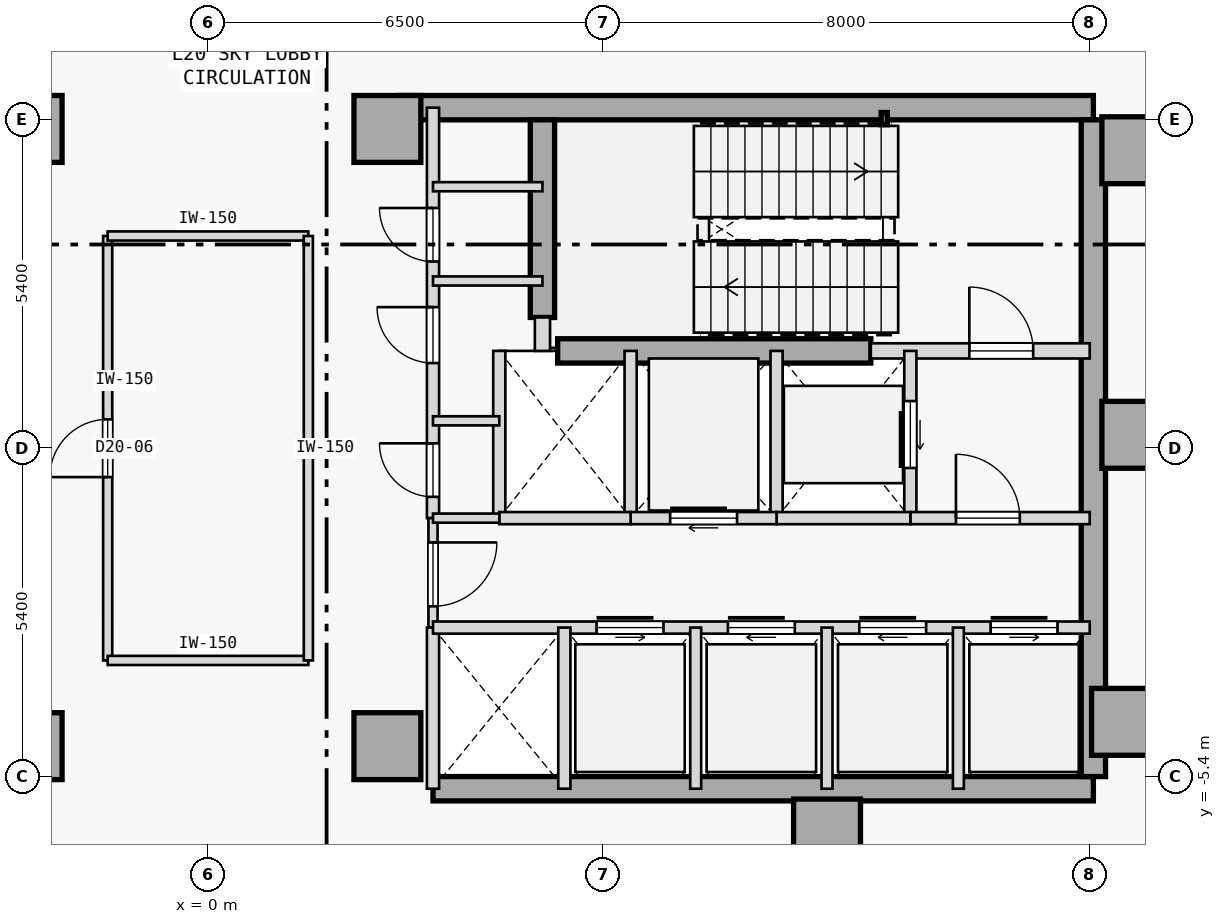
"""IFC4 building model, lengths in metres.
Left out: names, types, materials, properties, quantities, classifications, styles, units other than length and angle.
Written with IfcOpenShell. Run it as: python <this file> out.ifc"""

import sys

from ifc_helpers import new_model, si_unit, direction, frame, frame_2d, origin, origin_2d, place, context, subcontext, project, spatial, rectangle, hollow_rectangle, extrude, element, fill, save


model = new_model("IFC4")
c1 = context("Model", 3, precision=1e-05, world=origin(), true_north=direction((0.0, 1.0)))
c2 = subcontext(c1, "Body", "Model", "MODEL_VIEW")
j1 = project(units=[si_unit("LENGTHUNIT", "METRE"), si_unit("PLANEANGLEUNIT", "RADIAN")], contexts=[c1])
p1 = place(None, origin())
s1 = spatial("IfcSite", under=j1, at=p1, CompositionType="ELEMENT")
p2 = place(p1, origin())
s2 = spatial("IfcBuilding", under=s1, at=p2, CompositionType="ELEMENT")
p3 = place(p2, frame((0.0, 0.0, 83.2)))
s3 = spatial("IfcBuildingStorey", under=s2, at=p3, CompositionType="ELEMENT", Elevation=83.2)
for number, where, z_axis, x_axis in (
    (1, (-2.95, -4.9, 0.0), (0.0, 0.0, 1.0), (1.0, 0.0, 0.0)),
    (2, (-2.95, 5.25, 0.0), (0.0, 0.0, 1.0), (1.0, 0.0, 0.0)),
    (3, (15.25, 4.9, 0.0), (0.0, 0.0, 1.0), (1.0, 0.0, 0.0)),
    (4, (15.25, 0.22, 0.0), (0.0, 0.0, 1.0), (1.0, 0.0, 0.0)),
    (5, (15.08, -4.5, 0.0), (0.0, 0.0, 1.0), (1.0, 0.0, 0.0)),
    (6, (10.18, -6.32, 0.0), (0.0, 0.0, 1.0), (1.0, 0.0, 0.0)),
    (7, (2.95, -4.9, 0.0), (0.0, 0.0, 1.0), (1.0, 0.0, 0.0)),
    (8, (2.95, 5.25, 0.0), (0.0, 0.0, 1.0), (1.0, 0.0, 0.0)),
):
    element("IfcColumn", number, at=place(p3, frame(where, z_axis=z_axis, x_axis=x_axis)), inside=s3, PredefinedType="COLUMN", context=c2, shape_type="SweptSolid", body=[
        extrude(rectangle(XDim=1.1, YDim=1.1, at=origin_2d()), origin(), (0.0, 0.0, 1.0), 4.2),
    ])
p4 = place(p3, frame((3.15, 5.6, 0.0), z_axis=(0.0, 0.0, 1.0), x_axis=(1.0, 0.0, 0.0)))
e9 = element("IfcWall", 9, at=p4, inside=s3, PredefinedType="SHEAR", context=c2, shape_type="SweptSolid", body=[
    extrude(rectangle(XDim=11.41, YDim=0.4, at=frame_2d((5.705, 0.0))), origin(), (0.0, 0.0, 1.0), 3.975),
])
p5 = place(p3, frame((3.7, -5.6, 0.0), z_axis=(0.0, 0.0, 1.0), x_axis=(1.0, 0.0, 0.0)))
e10 = element("IfcWall", 10, at=p5, inside=s3, PredefinedType="SHEAR", context=c2, shape_type="SweptSolid", body=[
    extrude(rectangle(XDim=10.86, YDim=0.4, at=frame_2d((5.43, 0.0))), origin(), (0.0, 0.0, 1.0), 3.975),
])
p6 = place(p3, frame((14.56, -5.4, 0.0), z_axis=(0.0, 0.0, 1.0), x_axis=(0.0, 1.0, 0.0)))
e11 = element("IfcWall", 11, at=p6, inside=s3, PredefinedType="SHEAR", context=c2, shape_type="SweptSolid", body=[
    extrude(rectangle(XDim=10.8, YDim=0.4, at=frame_2d((5.4, 0.0))), origin(), (0.0, 0.0, 1.0), 3.975),
])
p7 = place(p3, frame((5.5, 2.15, 0.0), z_axis=(0.0, 0.0, 1.0), x_axis=(0.0, 1.0, 0.0)))
e12 = element("IfcWall", 12, at=p7, inside=s3, PredefinedType="SHEAR", context=c2, shape_type="SweptSolid", body=[
    extrude(rectangle(XDim=3.25, YDim=0.4, at=frame_2d((1.625, 0.0))), origin(), (0.0, 0.0, 1.0), 3.975),
])
p8 = place(p3, frame((5.75, 1.6, 0.0), z_axis=(0.0, 0.0, 1.0), x_axis=(1.0, 0.0, 0.0)))
e13 = element("IfcWall", 13, at=p8, inside=s3, PredefinedType="SHEAR", context=c2, shape_type="SweptSolid", body=[
    extrude(rectangle(XDim=5.15, YDim=0.4, at=frame_2d((2.575, 0.0))), origin(), (0.0, 0.0, 1.0), 3.975),
])
p9 = place(p3, frame((11.12, 5.42, 0.0), z_axis=(0.0, 0.0, 1.0), x_axis=(1.0, 0.0, 0.0)))
e14 = element("IfcColumn", 14, at=p9, inside=s3, PredefinedType="COLUMN", context=c2, shape_type="SweptSolid", body=[
    extrude(hollow_rectangle(XDim=0.1, YDim=0.2, WallThickness=0.008, at=origin_2d()), origin(), (0.0, 0.0, 1.0), 4.2),
])
p10 = place(p3, frame((10.9, 1.6, 0.0), z_axis=(0.0, 0.0, 1.0), x_axis=(1.0, 0.0, 0.0)))
e15 = element("IfcWall", 15, at=p10, inside=s3, PredefinedType="STANDARD", context=c2, shape_type="SweptSolid", body=[
    extrude(rectangle(XDim=3.6, YDim=0.25, at=frame_2d((1.8, 0.0))), origin(), (0.0, 0.0, 1.0), 3.975),
])
p11 = place(p10, frame((1.62, 0.0, 0.0)))
e16 = element("IfcOpeningElement", 16, at=p11, cuts=e15, PredefinedType="OPENING", context=c2, shape_type="SweptSolid", body=[
    extrude(rectangle(XDim=1.05, YDim=2.15, at=frame_2d((0.525, 1.075))), frame((0.0, 0.135, 0.0), z_axis=(0.0, -1.0, 0.0), x_axis=(1.0, 0.0, 0.0)), (0.0, 0.0, 1.0), 0.27),
])
p12 = place(p3, frame((5.5, 1.6, 0.0), z_axis=(0.0, 0.0, 1.0), x_axis=(0.0, 1.0, 0.0)))
e17 = element("IfcWall", 17, at=p12, inside=s3, PredefinedType="STANDARD", context=c2, shape_type="SweptSolid", body=[
    extrude(rectangle(XDim=0.55, YDim=0.25, at=frame_2d((0.275, 0.0))), origin(), (0.0, 0.0, 1.0), 3.975),
])
p13 = place(p3, frame((3.7, -1.15, 0.0), z_axis=(0.0, 0.0, 1.0), x_axis=(0.0, 1.0, 0.0)))
e18 = element("IfcWall", 18, at=p13, inside=s3, PredefinedType="STANDARD", context=c2, shape_type="SweptSolid", body=[
    extrude(rectangle(XDim=6.75, YDim=0.2, at=frame_2d((3.375, 0.0))), origin(), (0.0, 0.0, 1.0), 3.975),
])
p14 = place(p13, frame((0.35, 0.0, 0.0)))
e19 = element("IfcOpeningElement", 19, at=p14, cuts=e18, PredefinedType="OPENING", context=c2, shape_type="SweptSolid", body=[
    extrude(rectangle(XDim=0.88, YDim=2.15, at=frame_2d((0.44, 1.075))), frame((0.0, 0.11, 0.0), z_axis=(0.0, -1.0, 0.0), x_axis=(1.0, 0.0, 0.0)), (0.0, 0.0, 1.0), 0.22),
])
p15 = place(p13, frame((2.55, 0.0, 0.0)))
e20 = element("IfcOpeningElement", 20, at=p15, cuts=e18, PredefinedType="OPENING", context=c2, shape_type="SweptSolid", body=[
    extrude(rectangle(XDim=0.92, YDim=2.15, at=frame_2d((0.46, 1.075))), frame((0.0, 0.11, 0.0), z_axis=(0.0, -1.0, 0.0), x_axis=(1.0, 0.0, 0.0)), (0.0, 0.0, 1.0), 0.22),
])
p16 = place(p13, frame((4.22, 0.0, 0.0)))
e21 = element("IfcOpeningElement", 21, at=p16, cuts=e18, PredefinedType="OPENING", context=c2, shape_type="SweptSolid", body=[
    extrude(rectangle(XDim=0.88, YDim=2.15, at=frame_2d((0.44, 1.075))), frame((0.0, 0.11, 0.0), z_axis=(0.0, -1.0, 0.0), x_axis=(1.0, 0.0, 0.0)), (0.0, 0.0, 1.0), 0.22),
])
p17 = place(p3, frame((3.7, -2.95, 0.0), z_axis=(0.0, 0.0, 1.0), x_axis=(0.0, 1.0, 0.0)))
e22 = element("IfcWall", 22, at=p17, inside=s3, PredefinedType="PARTITIONING", context=c2, shape_type="SweptSolid", body=[
    extrude(rectangle(XDim=1.8, YDim=0.15, at=frame_2d((0.9, 0.0))), origin(), (0.0, 0.0, 1.0), 3.975),
])
p18 = place(p17, frame((0.35, 0.0, 0.0)))
e23 = element("IfcOpeningElement", 23, at=p18, cuts=e22, PredefinedType="OPENING", context=c2, shape_type="SweptSolid", body=[
    extrude(rectangle(XDim=1.05, YDim=2.18, at=frame_2d((0.525, 1.09))), frame((0.0, 0.085, 0.0), z_axis=(0.0, -1.0, 0.0), x_axis=(1.0, 0.0, 0.0)), (0.0, 0.0, 1.0), 0.17),
])
p19 = place(p3, frame((3.7, -5.6, 0.0), z_axis=(0.0, 0.0, 1.0), x_axis=(0.0, 1.0, 0.0)))
e24 = element("IfcWall", 24, at=p19, inside=s3, PredefinedType="STANDARD", context=c2, shape_type="SweptSolid", body=[
    extrude(rectangle(XDim=2.65, YDim=0.2, at=frame_2d((1.325, 0.0))), origin(), (0.0, 0.0, 1.0), 3.975),
])
p20 = place(p3, frame((11.55, -1.15, 0.0), z_axis=(0.0, 0.0, 1.0), x_axis=(0.0, 1.0, 0.0)))
e25 = element("IfcWall", 25, at=p20, inside=s3, PredefinedType="STANDARD", context=c2, shape_type="SweptSolid", body=[
    extrude(rectangle(XDim=2.75, YDim=0.2, at=frame_2d((1.375, 0.0))), origin(), (0.0, 0.0, 1.0), 3.975),
])
p21 = place(p20, frame((0.825, 0.0, 0.0)))
e26 = element("IfcOpeningElement", 26, at=p21, cuts=e25, PredefinedType="OPENING", context=c2, shape_type="SweptSolid", body=[
    extrude(rectangle(XDim=1.1, YDim=2.15, at=frame_2d((0.55, 1.075))), frame((0.0, 0.11, 0.0), z_axis=(0.0, -1.0, 0.0), x_axis=(1.0, 0.0, 0.0)), (0.0, 0.0, 1.0), 0.22),
])
p22 = place(p3, frame((9.35, -1.15, 0.0), z_axis=(0.0, 0.0, 1.0), x_axis=(0.0, 1.0, 0.0)))
e27 = element("IfcWall", 27, at=p22, inside=s3, PredefinedType="STANDARD", context=c2, shape_type="SweptSolid", body=[
    extrude(rectangle(XDim=2.75, YDim=0.2, at=frame_2d((1.375, 0.0))), origin(), (0.0, 0.0, 1.0), 3.975),
])
p23 = place(p3, frame((11.55, -1.15, 0.0), z_axis=(0.0, 0.0, 1.0), x_axis=(1.0, 0.0, 0.0)))
e28 = element("IfcWall", 28, at=p23, inside=s3, PredefinedType="STANDARD", context=c2, shape_type="SweptSolid", body=[
    extrude(rectangle(XDim=2.95, YDim=0.2, at=frame_2d((1.475, 0.0))), origin(), (0.0, 0.0, 1.0), 3.975),
])
p24 = place(p23, frame((0.75, 0.0, 0.0)))
e29 = element("IfcOpeningElement", 29, at=p24, cuts=e28, PredefinedType="OPENING", context=c2, shape_type="SweptSolid", body=[
    extrude(rectangle(XDim=1.05, YDim=2.18, at=frame_2d((0.525, 1.09))), frame((0.0, 0.11, 0.0), z_axis=(0.0, -1.0, 0.0), x_axis=(1.0, 0.0, 0.0)), (0.0, 0.0, 1.0), 0.22),
])
p25 = place(p3, frame((9.35, -1.15, 0.0), z_axis=(0.0, 0.0, 1.0), x_axis=(1.0, 0.0, 0.0)))
e30 = element("IfcWall", 30, at=p25, inside=s3, PredefinedType="STANDARD", context=c2, shape_type="SweptSolid", body=[
    extrude(rectangle(XDim=2.2, YDim=0.2, at=frame_2d((1.1, 0.0))), origin(), (0.0, 0.0, 1.0), 3.975),
])
p26 = place(p3, frame((6.95, -1.15, 0.0), z_axis=(0.0, 0.0, 1.0), x_axis=(0.0, 1.0, 0.0)))
e31 = element("IfcWall", 31, at=p26, inside=s3, PredefinedType="STANDARD", context=c2, shape_type="SweptSolid", body=[
    extrude(rectangle(XDim=2.75, YDim=0.2, at=frame_2d((1.375, 0.0))), origin(), (0.0, 0.0, 1.0), 3.975),
])
p27 = place(p3, frame((6.95, -1.15, 0.0), z_axis=(0.0, 0.0, 1.0), x_axis=(1.0, 0.0, 0.0)))
e32 = element("IfcWall", 32, at=p27, inside=s3, PredefinedType="STANDARD", context=c2, shape_type="SweptSolid", body=[
    extrude(rectangle(XDim=2.4, YDim=0.2, at=frame_2d((1.2, 0.0))), origin(), (0.0, 0.0, 1.0), 3.975),
])
p28 = place(p27, frame((0.65, 0.0, 0.0)))
e33 = element("IfcOpeningElement", 33, at=p28, cuts=e32, PredefinedType="OPENING", context=c2, shape_type="SweptSolid", body=[
    extrude(rectangle(XDim=1.1, YDim=2.15, at=frame_2d((0.55, 1.075))), frame((0.0, 0.11, 0.0), z_axis=(0.0, -1.0, 0.0), x_axis=(1.0, 0.0, 0.0)), (0.0, 0.0, 1.0), 0.22),
])
p29 = place(p3, frame((4.79, -1.15, 0.0), z_axis=(0.0, 0.0, 1.0), x_axis=(0.0, 1.0, 0.0)))
e34 = element("IfcWall", 34, at=p29, inside=s3, PredefinedType="STANDARD", context=c2, shape_type="SweptSolid", body=[
    extrude(rectangle(XDim=2.75, YDim=0.2, at=frame_2d((1.375, 0.0))), origin(), (0.0, 0.0, 1.0), 3.975),
])
p30 = place(p3, frame((4.79, -1.15, 0.0), z_axis=(0.0, 0.0, 1.0), x_axis=(1.0, 0.0, 0.0)))
e35 = element("IfcWall", 35, at=p30, inside=s3, PredefinedType="STANDARD", context=c2, shape_type="SweptSolid", body=[
    extrude(rectangle(XDim=2.16, YDim=0.2, at=frame_2d((1.08, 0.0))), origin(), (0.0, 0.0, 1.0), 3.975),
])
p31 = place(p3, frame((3.7, -1.15, 0.0), z_axis=(0.0, 0.0, 1.0), x_axis=(1.0, 0.0, 0.0)))
e36 = element("IfcWall", 36, at=p31, inside=s3, PredefinedType="PARTITIONING", context=c2, shape_type="SweptSolid", body=[
    extrude(rectangle(XDim=1.09, YDim=0.15, at=frame_2d((0.545, 0.0))), origin(), (0.0, 0.0, 1.0), 3.975),
])
p32 = place(p3, frame((3.7, -2.95, 0.0), z_axis=(0.0, 0.0, 1.0), x_axis=(1.0, 0.0, 0.0)))
e37 = element("IfcWall", 37, at=p32, inside=s3, PredefinedType="STANDARD", context=c2, shape_type="SweptSolid", body=[
    extrude(rectangle(XDim=10.8, YDim=0.2, at=frame_2d((5.4, 0.0))), origin(), (0.0, 0.0, 1.0), 3.975),
])
p33 = place(p32, frame((2.69, 0.0, 0.0)))
e38 = element("IfcOpeningElement", 38, at=p33, cuts=e37, PredefinedType="OPENING", context=c2, shape_type="SweptSolid", body=[
    extrude(rectangle(XDim=1.1, YDim=2.15, at=frame_2d((0.55, 1.075))), frame((0.0, 0.11, 0.0), z_axis=(0.0, -1.0, 0.0), x_axis=(1.0, 0.0, 0.0)), (0.0, 0.0, 1.0), 0.22),
])
p34 = place(p32, frame((4.85, 0.0, 0.0)))
e39 = element("IfcOpeningElement", 39, at=p34, cuts=e37, PredefinedType="OPENING", context=c2, shape_type="SweptSolid", body=[
    extrude(rectangle(XDim=1.1, YDim=2.15, at=frame_2d((0.55, 1.075))), frame((0.0, 0.11, 0.0), z_axis=(0.0, -1.0, 0.0), x_axis=(1.0, 0.0, 0.0)), (0.0, 0.0, 1.0), 0.22),
])
p35 = place(p32, frame((7.01, 0.0, 0.0)))
e40 = element("IfcOpeningElement", 40, at=p35, cuts=e37, PredefinedType="OPENING", context=c2, shape_type="SweptSolid", body=[
    extrude(rectangle(XDim=1.1, YDim=2.15, at=frame_2d((0.55, 1.075))), frame((0.0, 0.11, 0.0), z_axis=(0.0, -1.0, 0.0), x_axis=(1.0, 0.0, 0.0)), (0.0, 0.0, 1.0), 0.22),
])
p36 = place(p32, frame((9.17, 0.0, 0.0)))
e41 = element("IfcOpeningElement", 41, at=p36, cuts=e37, PredefinedType="OPENING", context=c2, shape_type="SweptSolid", body=[
    extrude(rectangle(XDim=1.1, YDim=2.15, at=frame_2d((0.55, 1.075))), frame((0.0, 0.11, 0.0), z_axis=(0.0, -1.0, 0.0), x_axis=(1.0, 0.0, 0.0)), (0.0, 0.0, 1.0), 0.22),
])
p37 = place(p3, frame((5.86, -5.6, 0.0), z_axis=(0.0, 0.0, 1.0), x_axis=(0.0, 1.0, 0.0)))
e42 = element("IfcWall", 42, at=p37, inside=s3, PredefinedType="STANDARD", context=c2, shape_type="SweptSolid", body=[
    extrude(rectangle(XDim=2.65, YDim=0.2, at=frame_2d((1.325, 0.0))), origin(), (0.0, 0.0, 1.0), 3.975),
])
for number, where, z_axis, x_axis in (
    (43, (12.34, -5.6, 0.0), (0.0, 0.0, 1.0), (0.0, 1.0, 0.0)),
    (44, (10.18, -5.6, 0.0), (0.0, 0.0, 1.0), (0.0, 1.0, 0.0)),
    (45, (8.02, -5.6, 0.0), (0.0, 0.0, 1.0), (0.0, 1.0, 0.0)),
):
    element("IfcWall", number, at=place(p3, frame(where, z_axis=z_axis, x_axis=x_axis)), inside=s3, PredefinedType="STANDARD", context=c2, shape_type="SweptSolid", body=[
        extrude(rectangle(XDim=2.65, YDim=0.18, at=frame_2d((1.325, 0.0))), origin(), (0.0, 0.0, 1.0), 3.975),
    ])
p38 = place(p3, frame((3.7, 4.3, 0.0), z_axis=(0.0, 0.0, 1.0), x_axis=(1.0, 0.0, 0.0)))
e46 = element("IfcWall", 46, at=p38, inside=s3, PredefinedType="PARTITIONING", context=c2, shape_type="SweptSolid", body=[
    extrude(rectangle(XDim=1.8, YDim=0.15, at=frame_2d((0.9, 0.0))), origin(), (0.0, 0.0, 1.0), 3.975),
])
p39 = place(p3, frame((3.7, 0.45, 0.0), z_axis=(0.0, 0.0, 1.0), x_axis=(1.0, 0.0, 0.0)))
e47 = element("IfcWall", 47, at=p39, inside=s3, PredefinedType="PARTITIONING", context=c2, shape_type="SweptSolid", body=[
    extrude(rectangle(XDim=1.09, YDim=0.15, at=frame_2d((0.545, 0.0))), origin(), (0.0, 0.0, 1.0), 3.975),
])
p40 = place(p3, frame((3.7, 2.75, 0.0), z_axis=(0.0, 0.0, 1.0), x_axis=(1.0, 0.0, 0.0)))
e48 = element("IfcWall", 48, at=p40, inside=s3, PredefinedType="PARTITIONING", context=c2, shape_type="SweptSolid", body=[
    extrude(rectangle(XDim=1.8, YDim=0.15, at=frame_2d((0.9, 0.0))), origin(), (0.0, 0.0, 1.0), 3.975),
])
p41 = place(p3, frame((-1.65, -3.49, 0.0), z_axis=(0.0, 0.0, 1.0), x_axis=(-0.000104928124, 0.999999994495, 0.0)))
e49 = element("IfcWall", 49, at=p41, inside=s3, PredefinedType="PARTITIONING", context=c2, shape_type="SweptSolid", body=[
    extrude(rectangle(XDim=6.98, YDim=0.15, at=frame_2d((3.49, 0.0))), origin(), (0.0, 0.0, 1.0), 3.975),
])
p42 = place(p41, frame((3.015, 0.0, 0.0)))
e50 = element("IfcOpeningElement", 50, at=p42, cuts=e49, PredefinedType="OPENING", context=c2, shape_type="SweptSolid", body=[
    extrude(rectangle(XDim=0.95, YDim=2.15, at=frame_2d((0.475, 1.075))), frame((0.0, 0.085, 0.0), z_axis=(0.0, -1.0, 0.0), x_axis=(1.0, 0.0, 0.0)), (0.0, 0.0, 1.0), 0.17),
])
p43 = place(p3, frame((-1.65, -3.49, 0.0), z_axis=(0.0, 0.0, 1.0), x_axis=(1.0, 0.0, 0.0)))
e51 = element("IfcWall", 51, at=p43, inside=s3, PredefinedType="PARTITIONING", context=c2, shape_type="SweptSolid", body=[
    extrude(rectangle(XDim=3.3, YDim=0.15, at=frame_2d((1.65, 0.0))), origin(), (0.0, 0.0, 1.0), 3.975),
])
p44 = place(p3, frame((-1.65, 3.49, 0.0), z_axis=(0.0, 0.0, 1.0), x_axis=(1.0, 0.0, 0.0)))
e52 = element("IfcWall", 52, at=p44, inside=s3, PredefinedType="PARTITIONING", context=c2, shape_type="SweptSolid", body=[
    extrude(rectangle(XDim=3.3, YDim=0.15, at=frame_2d((1.65, 0.0))), origin(), (0.0, 0.0, 1.0), 3.975),
])
p45 = place(p3, frame((1.65, -3.49, 0.0), z_axis=(0.0, 0.0, 1.0), x_axis=(-6.9952083e-05, 0.999999997553, 0.0)))
e53 = element("IfcWall", 53, at=p45, inside=s3, PredefinedType="PARTITIONING", context=c2, shape_type="SweptSolid", body=[
    extrude(rectangle(XDim=6.98, YDim=0.15, at=frame_2d((3.49, 0.0))), origin(), (0.0, 0.0, 1.0), 3.975),
])
p46 = place(p11, origin())
e54 = element("IfcDoor", 54, at=p46, inside=s3, OperationType="SINGLE_SWING_LEFT", PredefinedType="DOOR", context=c2, shape_type="SweptSolid", body=[
    extrude(rectangle(XDim=1.05, YDim=2.15, at=frame_2d((0.525, 1.075))), frame((0.0, 0.025, 0.0), z_axis=(0.0, -1.0, 0.0), x_axis=(1.0, 0.0, 0.0)), (0.0, 0.0, 1.0), 0.05),
])
fill(e16, e54)
p47 = place(p24, origin())
e55 = element("IfcDoor", 55, at=p47, inside=s3, OperationType="SINGLE_SWING_LEFT", PredefinedType="DOOR", context=c2, shape_type="SweptSolid", body=[
    extrude(rectangle(XDim=1.05, YDim=2.18, at=frame_2d((0.525, 1.09))), frame((0.0, 0.025, 0.0), z_axis=(0.0, -1.0, 0.0), x_axis=(1.0, 0.0, 0.0)), (0.0, 0.0, 1.0), 0.05),
])
fill(e29, e55)
p48 = place(p18, frame((1.05, 0.0, 0.0), z_axis=(0.0, 0.0, 1.0), x_axis=(-1.0, 0.0, 0.0)))
e56 = element("IfcDoor", 56, at=p48, inside=s3, OperationType="SINGLE_SWING_RIGHT", PredefinedType="DOOR", context=c2, shape_type="SweptSolid", body=[
    extrude(rectangle(XDim=1.05, YDim=2.18, at=frame_2d((0.525, 1.09))), frame((0.0, 0.025, 0.0), z_axis=(0.0, -1.0, 0.0), x_axis=(1.0, 0.0, 0.0)), (0.0, 0.0, 1.0), 0.05),
])
fill(e23, e56)
p49 = place(p21, origin())
e57 = element("IfcDoor", 57, at=p49, inside=s3, OperationType="SLIDING_TO_RIGHT", PredefinedType="DOOR", context=c2, shape_type="SweptSolid", body=[
    extrude(rectangle(XDim=1.1, YDim=2.15, at=frame_2d((0.55, 1.075))), frame((0.0, 0.025, 0.0), z_axis=(0.0, -1.0, 0.0), x_axis=(1.0, 0.0, 0.0)), (0.0, 0.0, 1.0), 0.05),
])
fill(e26, e57)
p50 = place(p28, origin())
e58 = element("IfcDoor", 58, at=p50, inside=s3, OperationType="SLIDING_TO_RIGHT", PredefinedType="DOOR", context=c2, shape_type="SweptSolid", body=[
    extrude(rectangle(XDim=1.1, YDim=2.15, at=frame_2d((0.55, 1.075))), frame((0.0, 0.025, 0.0), z_axis=(0.0, -1.0, 0.0), x_axis=(1.0, 0.0, 0.0)), (0.0, 0.0, 1.0), 0.05),
])
fill(e33, e58)
p51 = place(p33, origin())
e59 = element("IfcDoor", 59, at=p51, inside=s3, OperationType="SLIDING_TO_LEFT", PredefinedType="DOOR", context=c2, shape_type="SweptSolid", body=[
    extrude(rectangle(XDim=1.1, YDim=2.15, at=frame_2d((0.55, 1.075))), frame((0.0, 0.025, 0.0), z_axis=(0.0, -1.0, 0.0), x_axis=(1.0, 0.0, 0.0)), (0.0, 0.0, 1.0), 0.05),
])
fill(e38, e59)
p52 = place(p34, origin())
e60 = element("IfcDoor", 60, at=p52, inside=s3, OperationType="SLIDING_TO_RIGHT", PredefinedType="DOOR", context=c2, shape_type="SweptSolid", body=[
    extrude(rectangle(XDim=1.1, YDim=2.15, at=frame_2d((0.55, 1.075))), frame((0.0, 0.025, 0.0), z_axis=(0.0, -1.0, 0.0), x_axis=(1.0, 0.0, 0.0)), (0.0, 0.0, 1.0), 0.05),
])
fill(e39, e60)
p53 = place(p35, origin())
e61 = element("IfcDoor", 61, at=p53, inside=s3, OperationType="SLIDING_TO_RIGHT", PredefinedType="DOOR", context=c2, shape_type="SweptSolid", body=[
    extrude(rectangle(XDim=1.1, YDim=2.15, at=frame_2d((0.55, 1.075))), frame((0.0, 0.025, 0.0), z_axis=(0.0, -1.0, 0.0), x_axis=(1.0, 0.0, 0.0)), (0.0, 0.0, 1.0), 0.05),
])
fill(e40, e61)
p54 = place(p36, origin())
e62 = element("IfcDoor", 62, at=p54, inside=s3, OperationType="SLIDING_TO_LEFT", PredefinedType="DOOR", context=c2, shape_type="SweptSolid", body=[
    extrude(rectangle(XDim=1.1, YDim=2.15, at=frame_2d((0.55, 1.075))), frame((0.0, 0.025, 0.0), z_axis=(0.0, -1.0, 0.0), x_axis=(1.0, 0.0, 0.0)), (0.0, 0.0, 1.0), 0.05),
])
fill(e41, e62)
p55 = place(p14, origin())
e63 = element("IfcDoor", 63, at=p55, inside=s3, OperationType="SINGLE_SWING_RIGHT", PredefinedType="DOOR", context=c2, shape_type="SweptSolid", body=[
    extrude(rectangle(XDim=0.88, YDim=2.15, at=frame_2d((0.44, 1.075))), frame((0.0, 0.025, 0.0), z_axis=(0.0, -1.0, 0.0), x_axis=(1.0, 0.0, 0.0)), (0.0, 0.0, 1.0), 0.05),
])
fill(e19, e63)
p56 = place(p15, origin())
e64 = element("IfcDoor", 64, at=p56, inside=s3, OperationType="SINGLE_SWING_RIGHT", PredefinedType="DOOR", context=c2, shape_type="SweptSolid", body=[
    extrude(rectangle(XDim=0.92, YDim=2.15, at=frame_2d((0.46, 1.075))), frame((0.0, 0.025, 0.0), z_axis=(0.0, -1.0, 0.0), x_axis=(1.0, 0.0, 0.0)), (0.0, 0.0, 1.0), 0.05),
])
fill(e20, e64)
p57 = place(p16, origin())
e65 = element("IfcDoor", 65, at=p57, inside=s3, OperationType="SINGLE_SWING_RIGHT", PredefinedType="DOOR", context=c2, shape_type="SweptSolid", body=[
    extrude(rectangle(XDim=0.88, YDim=2.15, at=frame_2d((0.44, 1.075))), frame((0.0, 0.025, 0.0), z_axis=(0.0, -1.0, 0.0), x_axis=(1.0, 0.0, 0.0)), (0.0, 0.0, 1.0), 0.05),
])
fill(e21, e65)
p58 = place(p42, origin())
e66 = element("IfcDoor", 66, at=p58, inside=s3, OperationType="SINGLE_SWING_LEFT", PredefinedType="DOOR", context=c2, shape_type="SweptSolid", body=[
    extrude(rectangle(XDim=0.95, YDim=2.15, at=frame_2d((0.475, 1.075))), frame((0.0, 0.025, 0.0), z_axis=(0.0, -1.0, 0.0), x_axis=(1.0, 0.0, 0.0)), (0.0, 0.0, 1.0), 0.05),
])
fill(e50, e66)
save(model, sys.argv[1])
